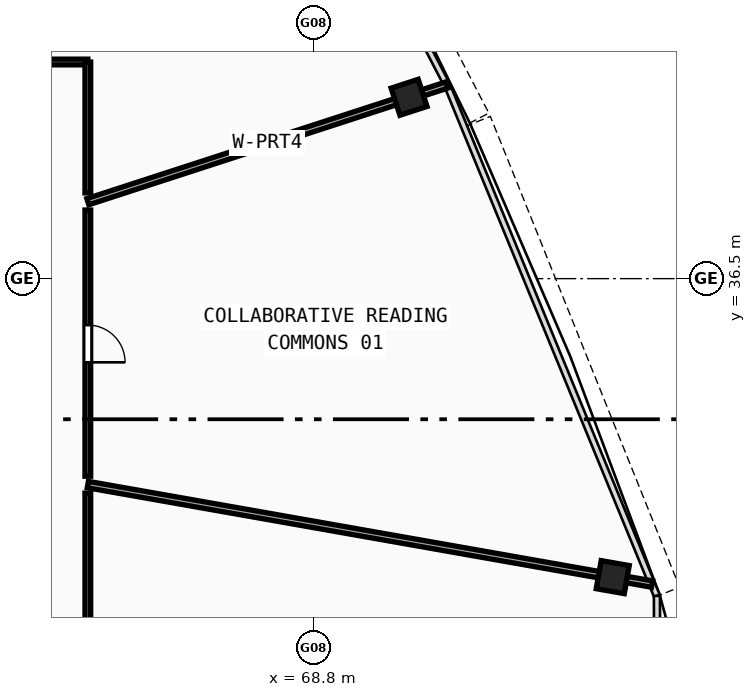
"""IFC4 building model, lengths in metres.
Left out: names, types, materials, properties, quantities, classifications, styles, units other than length and angle.
Written with IfcOpenShell. Run it as: python <this file> out.ifc"""

import sys

from ifc_helpers import new_model, si_unit, direction, frame, frame_2d, origin, origin_with_axes, origin_2d, place, context, subcontext, project, spatial, rectangle, hollow_rectangle, extrude, source, transform, mapped, element, fill, save


model = new_model("IFC4")
c1 = context("Model", 3, precision=1e-05, world=origin(), true_north=direction((0.0, 1.0)))
c2 = subcontext(c1, "Body", "Model", "MODEL_VIEW")
j1 = project(units=[si_unit("LENGTHUNIT", "METRE"), si_unit("PLANEANGLEUNIT", "RADIAN")], contexts=[c1])
p1 = place(None, origin())
s1 = spatial("IfcSite", under=j1, at=p1, CompositionType="ELEMENT")
p2 = place(p1, origin())
s2 = spatial("IfcBuilding", under=s1, at=p2, CompositionType="ELEMENT")
p3 = place(p2, frame((0.0, 0.0, 314.86)))
s3 = spatial("IfcBuildingStorey", under=s2, at=p3, CompositionType="ELEMENT", Elevation=314.86)
m1 = source(origin(), c2, "Body", "SweptSolid", [
    extrude(hollow_rectangle(XDim=0.75, YDim=0.75, WallThickness=0.028, at=origin_2d()), origin(), (0.0, 0.0, 1.0), 5.83),
])
for number, where, z_axis, x_axis in (
    (1, (76.662, 28.646, -0.26), (0.0, 0.0, 1.0), (0.174, 0.985, 0.0)),
    (2, (71.302, 41.271, -0.26), (0.0, 0.0, 1.0), (-0.309, 0.951, 0.0)),
):
    element("IfcColumn", number, at=place(p3, frame(where, z_axis=z_axis, x_axis=x_axis)), inside=s3, PredefinedType="COLUMN", context=c2, shape_type="MappedRepresentation", body=[
        mapped(m1, transform((0.0, 0.0, 0.0), scale=1.0)),
    ])
p4 = place(p3, frame((62.85, 38.525, 0.0), z_axis=(0.0, 0.0, 1.0), x_axis=(0.951056273407, 0.309017741906, 0.0)))
e3 = element("IfcWall", 3, at=p4, inside=s3, PredefinedType="PARTITIONING", context=c2, shape_type="SweptSolid", body=[
    extrude(rectangle(XDim=9.937, YDim=0.17, at=frame_2d((4.969, 0.0))), origin(), (0.0, 0.0, 1.0), 2.22),
])
p5 = place(p3, frame((57.44, 42.2, 0.0), z_axis=(0.0, 0.0, 1.0), x_axis=(0.743143971996, 0.669131554245, 0.0)))
e4 = element("IfcWall", 4, at=p5, inside=s3, PredefinedType="PARTITIONING", context=c2, shape_type="SweptSolid", body=[
    extrude(rectangle(XDim=13.34, YDim=0.17, at=frame_2d((6.67, 0.0))), origin(), (0.0, 0.0, 1.0), 2.22),
])
p6 = place(p3, frame((62.85, 31.082, 0.0), z_axis=(0.0, 0.0, 1.0), x_axis=(0.984808005161, -0.173646747654, 0.0)))
e5 = element("IfcWall", 5, at=p6, inside=s3, PredefinedType="PARTITIONING", context=c2, shape_type="SweptSolid", body=[
    extrude(rectangle(XDim=15.075, YDim=0.17, at=frame_2d((7.537, 0.0))), origin(), (0.0, 0.0, 1.0), 2.22),
])
p7 = place(p3, frame((57.769, 42.2, 0.0), z_axis=(0.0, 0.0, 1.0), x_axis=(1.0, 0.0, 0.0)))
e6 = element("IfcWall", 6, at=p7, inside=s3, PredefinedType="PARTITIONING", context=c2, shape_type="SweptSolid", body=[
    extrude(rectangle(XDim=5.081, YDim=0.15, at=frame_2d((2.541, 0.0))), origin(), (0.0, 0.0, 1.0), 2.22),
])
p8 = place(p7, frame((2.131, 0.0, 0.0)))
e7 = element("IfcOpeningElement", 7, at=p8, cuts=e6, PredefinedType="OPENING", context=c2, shape_type="SweptSolid", body=[
    extrude(rectangle(XDim=0.98, YDim=2.12, at=frame_2d((0.49, 1.06))), frame((0.0, 0.085, 0.0), z_axis=(0.0, -1.0, 0.0), x_axis=(1.0, 0.0, 0.0)), (0.0, 0.0, 1.0), 0.17),
])
p9 = place(p3, frame((62.85, 42.2, 0.0), z_axis=(0.0, 0.0, 1.0), x_axis=(0.0, -1.0, 0.0)))
e8 = element("IfcWall", 8, at=p9, inside=s3, PredefinedType="PARTITIONING", context=c2, shape_type="SweptSolid", body=[
    extrude(rectangle(XDim=3.444, YDim=0.15, at=frame_2d((1.722, 0.0))), origin(), (0.0, 0.0, 1.0), 2.22),
])
p10 = place(p3, frame((62.85, 38.305, 0.0), z_axis=(0.0, 0.0, 1.0), x_axis=(0.0, -1.0, 0.0)))
e9 = element("IfcWall", 9, at=p10, inside=s3, PredefinedType="PARTITIONING", context=c2, shape_type="SweptSolid", body=[
    extrude(rectangle(XDim=7.004, YDim=0.15, at=frame_2d((3.502, 0.0))), origin(), (0.0, 0.0, 1.0), 2.22),
])
p11 = place(p10, frame((3.027, 0.0, 0.0)))
e10 = element("IfcOpeningElement", 10, at=p11, cuts=e9, PredefinedType="OPENING", context=c2, shape_type="SweptSolid", body=[
    extrude(rectangle(XDim=0.98, YDim=2.12, at=frame_2d((0.49, 1.06))), frame((0.0, 0.085, 0.0), z_axis=(0.0, -1.0, 0.0), x_axis=(1.0, 0.0, 0.0)), (0.0, 0.0, 1.0), 0.17),
])
p12 = place(p3, frame((62.85, 30.858, 0.0), z_axis=(0.0, 0.0, 1.0), x_axis=(0.0, -1.0, 0.0)))
e11 = element("IfcWall", 11, at=p12, inside=s3, PredefinedType="PARTITIONING", context=c2, shape_type="SweptSolid", body=[
    extrude(rectangle(XDim=5.958, YDim=0.15, at=frame_2d((2.979, 0.0))), origin(), (0.0, 0.0, 1.0), 2.22),
])
m2 = source(origin(), c2, "Body", "SweptSolid", [
    extrude(rectangle(XDim=0.98, YDim=2.12, at=frame_2d((0.49, 1.06))), frame((0.0, 0.025, 0.0), z_axis=(0.0, -1.0, 0.0), x_axis=(1.0, 0.0, 0.0)), (0.0, 0.0, 1.0), 0.05),
])
p13 = place(p11, origin_with_axes())
e12 = element("IfcDoor", 12, at=p13, inside=s3, OperationType="SINGLE_SWING_RIGHT", PredefinedType="DOOR", context=c2, shape_type="MappedRepresentation", body=[
    mapped(m2, transform((0.0, 0.0, 0.0), scale=1.0)),
])
fill(e10, e12)
save(model, sys.argv[1])
